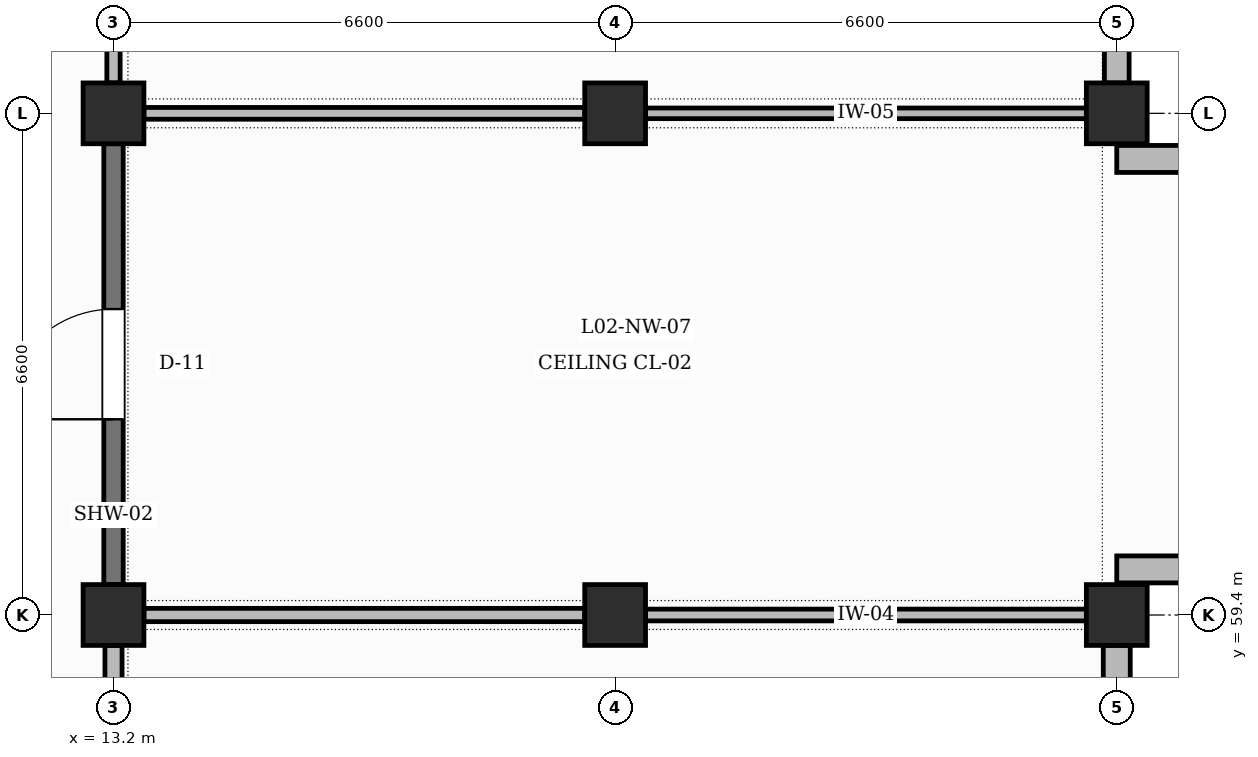
"""IFC4 building model, lengths in metres.
Left out: names, types, materials, properties, quantities, classifications, styles, units other than length and angle.
Written with IfcOpenShell. Run it as: python <this file> out.ifc"""

import sys

from ifc_helpers import new_model, si_unit, direction, frame, frame_2d, origin, origin_2d, place, context, subcontext, project, spatial, rectangle, extrude, element, fill, save


model = new_model("IFC4")
c1 = context("Model", 3, precision=1e-05, world=origin(), true_north=direction((0.0, 1.0)))
c2 = subcontext(c1, "Body", "Model", "MODEL_VIEW")
j1 = project(units=[si_unit("LENGTHUNIT", "METRE"), si_unit("PLANEANGLEUNIT", "RADIAN")], contexts=[c1])
p1 = place(None, origin())
s1 = spatial("IfcSite", under=j1, at=p1, CompositionType="ELEMENT")
p2 = place(p1, origin())
s2 = spatial("IfcBuilding", under=s1, at=p2, CompositionType="ELEMENT")
p3 = place(p2, frame((0.0, 0.0, 10.2)))
s3 = spatial("IfcBuildingStorey", under=s2, at=p3, CompositionType="ELEMENT", Elevation=10.2)
for number, where, z_axis, x_axis in (
    (1, (13.2, 59.4, 0.0), (0.0, 0.0, 1.0), (1.0, 0.0, 0.0)),
    (2, (13.2, 66.0, 0.0), (0.0, 0.0, 1.0), (1.0, 0.0, 0.0)),
    (3, (19.8, 59.4, 0.0), (0.0, 0.0, 1.0), (1.0, 0.0, 0.0)),
    (4, (19.8, 66.0, 0.0), (0.0, 0.0, 1.0), (1.0, 0.0, 0.0)),
    (5, (26.4, 59.4, 0.0), (0.0, 0.0, 1.0), (1.0, 0.0, 0.0)),
    (6, (26.4, 66.0, 0.0), (0.0, 0.0, 1.0), (1.0, 0.0, 0.0)),
):
    element("IfcColumn", number, at=place(p3, frame(where, z_axis=z_axis, x_axis=x_axis)), inside=s3, PredefinedType="COLUMN", context=c2, shape_type="SweptSolid", body=[
        extrude(rectangle(XDim=0.8, YDim=0.8, at=origin_2d()), origin(), (0.0, 0.0, 1.0), 4.2),
    ])
p4 = place(p3, frame((26.4, 53.2, 0.0), z_axis=(0.0, 0.0, 1.0), x_axis=(0.0, 1.0, 0.0)))
e7 = element("IfcWall", 7, at=p4, inside=s3, PredefinedType="SOLIDWALL", context=c2, shape_type="SweptSolid", body=[
    extrude(rectangle(XDim=5.8, YDim=0.355, at=frame_2d((2.9, 0.0))), origin(), (0.0, 0.0, 1.0), 3.25),
])
p5 = place(p4, frame((2.14, 0.0, 0.95)))
e8 = element("IfcOpeningElement", 8, at=p5, cuts=e7, PredefinedType="OPENING", context=c2, shape_type="SweptSolid", body=[
    extrude(rectangle(XDim=1.52, YDim=1.52, at=frame_2d((0.76, 0.76))), frame((0.0, 0.188, 0.0), z_axis=(0.0, -1.0, 0.0), x_axis=(1.0, 0.0, 0.0)), (0.0, 0.0, 1.0), 0.375),
])
for number, where, z_axis, x_axis in (
    (9, (26.4, 60.0, 0.0), (0.0, 0.0, 1.0), (1.0, 0.0, 0.0)),
    (10, (26.4, 65.4, 0.0), (0.0, 0.0, 1.0), (1.0, 0.0, 0.0)),
):
    element("IfcWall", number, at=place(p3, frame(where, z_axis=z_axis, x_axis=x_axis)), inside=s3, PredefinedType="SOLIDWALL", context=c2, shape_type="SweptSolid", body=[
        extrude(rectangle(XDim=2.0, YDim=0.355, at=frame_2d((1.0, 0.0))), origin(), (0.0, 0.0, 1.0), 3.25),
    ])
p6 = place(p3, frame((26.4, 66.4, 0.0), z_axis=(0.0, 0.0, 1.0), x_axis=(0.0, 1.0, 0.0)))
e11 = element("IfcWall", 11, at=p6, inside=s3, PredefinedType="SOLIDWALL", context=c2, shape_type="SweptSolid", body=[
    extrude(rectangle(XDim=5.8, YDim=0.325, at=frame_2d((2.9, 0.0))), origin(), (0.0, 0.0, 1.0), 3.25),
])
p7 = place(p6, frame((2.14, 0.0, 0.95)))
e12 = element("IfcOpeningElement", 12, at=p7, cuts=e11, PredefinedType="OPENING", context=c2, shape_type="SweptSolid", body=[
    extrude(rectangle(XDim=1.52, YDim=1.74, at=frame_2d((0.76, 0.87))), frame((0.0, 0.172, 0.0), z_axis=(0.0, -1.0, 0.0), x_axis=(1.0, 0.0, 0.0)), (0.0, 0.0, 1.0), 0.345),
])
p8 = place(p3, frame((13.2, 53.225, 0.0), z_axis=(0.0, 0.0, 1.0), x_axis=(0.0, 1.0, 0.0)))
e13 = element("IfcWall", 13, at=p8, inside=s3, PredefinedType="PARTITIONING", context=c2, shape_type="SweptSolid", body=[
    extrude(rectangle(XDim=5.775, YDim=0.225, at=frame_2d((2.887, 0.0))), origin(), (0.0, 0.0, 1.0), 3.1),
])
p9 = place(p8, frame((2.385, 0.0, 0.0)))
e14 = element("IfcOpeningElement", 14, at=p9, cuts=e13, PredefinedType="OPENING", context=c2, shape_type="SweptSolid", body=[
    extrude(rectangle(XDim=0.98, YDim=2.15, at=frame_2d((0.49, 1.075))), frame((0.0, 0.123, 0.0), z_axis=(0.0, -1.0, 0.0), x_axis=(1.0, 0.0, 0.0)), (0.0, 0.0, 1.0), 0.245),
])
p10 = place(p3, frame((13.2, 59.8, 0.0), z_axis=(0.0, 0.0, 1.0), x_axis=(0.0, 1.0, 0.0)))
e15 = element("IfcWall", 15, at=p10, inside=s3, PredefinedType="SHEAR", context=c2, shape_type="SweptSolid", body=[
    extrude(rectangle(XDim=5.8, YDim=0.255, at=frame_2d((2.9, 0.0))), origin(), (0.0, 0.0, 1.0), 3.1),
])
p11 = place(p10, frame((2.175, 0.0, 0.0)))
e16 = element("IfcOpeningElement", 16, at=p11, cuts=e15, PredefinedType="OPENING", context=c2, shape_type="SweptSolid", body=[
    extrude(rectangle(XDim=1.45, YDim=2.25, at=frame_2d((0.725, 1.125))), frame((0.0, 0.137, 0.0), z_axis=(0.0, -1.0, 0.0), x_axis=(1.0, 0.0, 0.0)), (0.0, 0.0, 1.0), 0.275),
])
p12 = place(p3, frame((13.2, 66.4, 0.0), z_axis=(0.0, 0.0, 1.0), x_axis=(0.0, 1.0, 0.0)))
e17 = element("IfcWall", 17, at=p12, inside=s3, PredefinedType="PARTITIONING", context=c2, shape_type="SweptSolid", body=[
    extrude(rectangle(XDim=5.8, YDim=0.175, at=frame_2d((2.9, 0.0))), origin(), (0.0, 0.0, 1.0), 3.1),
])
p13 = place(p12, frame((2.2, 0.0, 0.0)))
e18 = element("IfcOpeningElement", 18, at=p13, cuts=e17, PredefinedType="OPENING", context=c2, shape_type="SweptSolid", body=[
    extrude(rectangle(XDim=1.4, YDim=2.25, at=frame_2d((0.7, 1.125))), frame((0.0, 0.097, 0.0), z_axis=(0.0, -1.0, 0.0), x_axis=(1.0, 0.0, 0.0)), (0.0, 0.0, 1.0), 0.195),
])
p14 = place(p3, frame((13.6, 59.4, 0.0), z_axis=(0.0, 0.0, 1.0), x_axis=(1.0, 0.0, 0.0)))
e19 = element("IfcWall", 19, at=p14, inside=s3, PredefinedType="PARTITIONING", context=c2, shape_type="SweptSolid", body=[
    extrude(rectangle(XDim=5.8, YDim=0.175, at=frame_2d((2.9, 0.0))), origin(), (0.0, 0.0, 1.0), 3.1),
])
p15 = place(p3, frame((13.6, 66.0, 0.0), z_axis=(0.0, 0.0, 1.0), x_axis=(1.0, 0.0, 0.0)))
e20 = element("IfcWall", 20, at=p15, inside=s3, PredefinedType="PARTITIONING", context=c2, shape_type="SweptSolid", body=[
    extrude(rectangle(XDim=5.8, YDim=0.155, at=frame_2d((2.9, 0.0))), origin(), (0.0, 0.0, 1.0), 3.0),
])
p16 = place(p3, frame((20.2, 59.4, 0.0), z_axis=(0.0, 0.0, 1.0), x_axis=(1.0, 0.0, 0.0)))
e21 = element("IfcWall", 21, at=p16, inside=s3, PredefinedType="PARTITIONING", context=c2, shape_type="SweptSolid", body=[
    extrude(rectangle(XDim=5.8, YDim=0.155, at=frame_2d((2.9, 0.0))), origin(), (0.0, 0.0, 1.0), 3.4),
])
p17 = place(p3, frame((20.2, 66.0, 0.0), z_axis=(0.0, 0.0, 1.0), x_axis=(1.0, 0.0, 0.0)))
e22 = element("IfcWall", 22, at=p17, inside=s3, PredefinedType="PARTITIONING", context=c2, shape_type="SweptSolid", body=[
    extrude(rectangle(XDim=5.8, YDim=0.14, at=frame_2d((2.9, 0.0))), origin(), (0.0, 0.0, 1.0), 3.4),
])
p18 = place(p11, origin())
e23 = element("IfcDoor", 23, at=p18, inside=s3, OperationType="SINGLE_SWING_LEFT", PredefinedType="DOOR", context=c2, shape_type="SweptSolid", body=[
    extrude(rectangle(XDim=1.45, YDim=2.25, at=frame_2d((0.725, 1.125))), frame((0.0, 0.025, 0.0), z_axis=(0.0, -1.0, 0.0), x_axis=(1.0, 0.0, 0.0)), (0.0, 0.0, 1.0), 0.05),
])
fill(e16, e23)
save(model, sys.argv[1])
